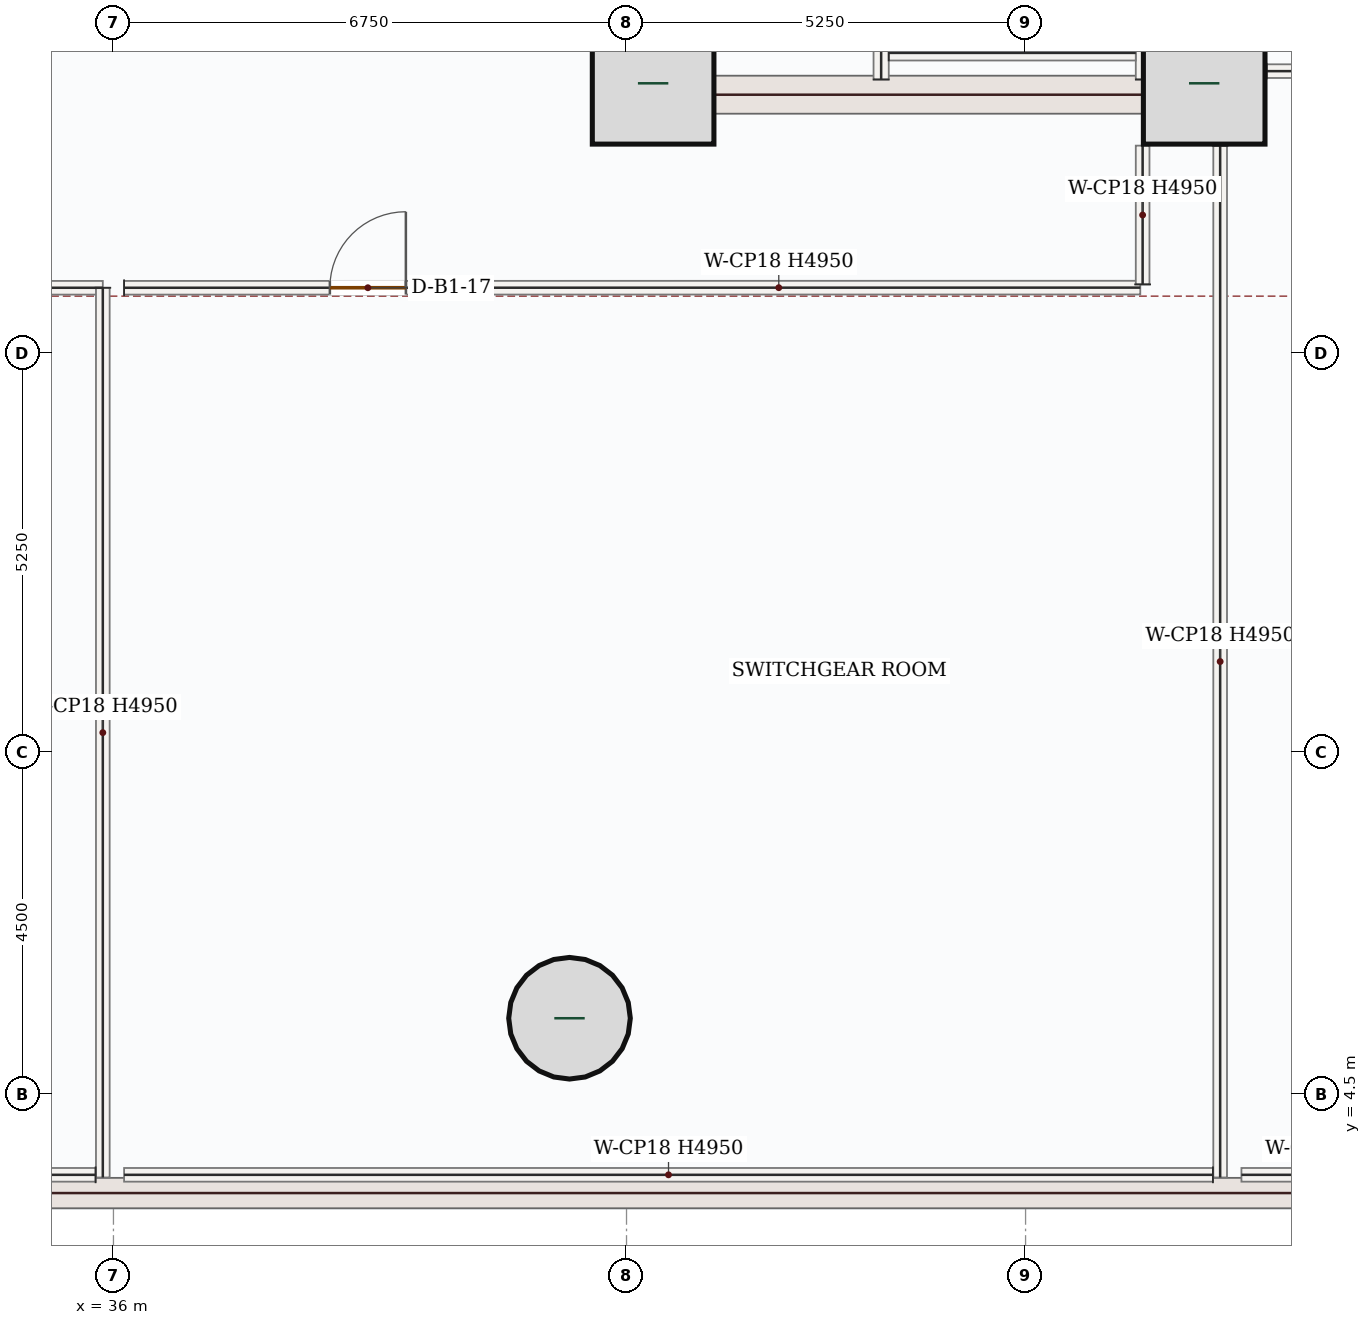
"""IFC4 building model, lengths in metres.
Left out: names, types, materials, properties, quantities, classifications, styles, units other than length and angle.
Written with IfcOpenShell. Run it as: python <this file> out.ifc"""

import sys

from ifc_helpers import new_model, si_unit, direction, frame, frame_2d, origin, origin_2d, place, context, subcontext, project, spatial, rectangle, hollow_circle, extrude, source, transform, mapped, element, fill, save


model = new_model("IFC4")
c1 = context("Model", 3, precision=1e-05, world=origin(), true_north=direction((0.0, 1.0)))
c2 = subcontext(c1, "Body", "Model", "MODEL_VIEW")
j1 = project(units=[si_unit("LENGTHUNIT", "METRE"), si_unit("PLANEANGLEUNIT", "RADIAN")], contexts=[c1])
p1 = place(None, origin())
s1 = spatial("IfcSite", under=j1, at=p1, CompositionType="ELEMENT")
p2 = place(p1, origin())
s2 = spatial("IfcBuilding", under=s1, at=p2, CompositionType="ELEMENT")
p3 = place(p2, frame((0.0, 0.0, -5.4)))
s3 = spatial("IfcBuildingStorey", under=s2, at=p3, CompositionType="ELEMENT", Elevation=-5.4)
m1 = source(origin(), c2, "Body", "SweptSolid", [
    extrude(rectangle(XDim=64.2, YDim=0.4, at=frame_2d((32.1, 0.0))), origin(), (0.0, 0.0, 1.0), 5.05),
])
p4 = place(p3, frame((3.9, 3.2, 0.0), z_axis=(0.0, 0.0, 1.0), x_axis=(1.0, 0.0, 0.0)))
e1 = element("IfcWall", 1, at=p4, inside=s3, PredefinedType="SHEAR", context=c2, shape_type="MappedRepresentation", body=[
    mapped(m1, transform((0.0, 0.0, 0.0), x_axis=(1.0, 0.0, 0.0), y_axis=(0.0, 1.0, 0.0), z_axis=(0.0, 0.0, 1.0), scale=1.0)),
])
p5 = place(p3, frame((43.0, 17.4, 0.0), z_axis=(0.0, 0.0, 1.0), x_axis=(0.0, 1.0, 0.0)))
e2 = element("IfcWall", 2, at=p5, inside=s3, PredefinedType="SHEAR", context=c2, shape_type="SweptSolid", body=[
    extrude(rectangle(XDim=8.55, YDim=0.5, at=frame_2d((4.275, 0.0))), origin(), (0.0, 0.0, 1.0), 4.95),
])
p6 = place(p5, frame((6.65, 0.0, 0.0)))
e3 = element("IfcOpeningElement", 3, at=p6, cuts=e2, PredefinedType="OPENING", context=c2, shape_type="SweptSolid", body=[
    extrude(rectangle(XDim=1.1, YDim=2.2, at=frame_2d((0.55, 1.1))), frame((0.0, 0.26, 0.0), z_axis=(0.0, -1.0, 0.0), x_axis=(1.0, 0.0, 0.0)), (0.0, 0.0, 1.0), 0.52),
])
p7 = place(p5, frame((1.75, 0.0, 0.0)))
e4 = element("IfcOpeningElement", 4, at=p7, cuts=e2, PredefinedType="OPENING", context=c2, shape_type="SweptSolid", body=[
    extrude(rectangle(XDim=1.3, YDim=2.2, at=frame_2d((0.65, 1.1))), frame((0.0, 0.26, 0.0), z_axis=(0.0, -1.0, 0.0), x_axis=(1.0, 0.0, 0.0)), (0.0, 0.0, 1.0), 0.52),
])
p8 = place(p5, frame((4.3, 0.0, 0.0)))
e5 = element("IfcOpeningElement", 5, at=p8, cuts=e2, PredefinedType="OPENING", context=c2, shape_type="SweptSolid", body=[
    extrude(rectangle(XDim=0.88, YDim=2.1, at=frame_2d((0.44, 1.05))), frame((0.0, 0.26, 0.0), z_axis=(0.0, -1.0, 0.0), x_axis=(1.0, 0.0, 0.0)), (0.0, 0.0, 1.0), 0.52),
])
m2 = source(origin(), c2, "Body", "SweptSolid", [
    extrude(rectangle(XDim=8.55, YDim=0.5, at=frame_2d((4.275, 0.0))), origin(), (0.0, 0.0, 1.0), 4.95),
])
p9 = place(p3, frame((50.5, 17.4, 0.0), z_axis=(0.0, 0.0, 1.0), x_axis=(0.0, 1.0, 0.0)))
e6 = element("IfcWall", 6, at=p9, inside=s3, PredefinedType="SHEAR", context=c2, shape_type="MappedRepresentation", body=[
    mapped(m2, transform((0.0, 0.0, 0.0), x_axis=(1.0, 0.0, 0.0), y_axis=(0.0, 1.0, 0.0), z_axis=(0.0, 0.0, 1.0), scale=1.0)),
])
m3 = source(origin(), c2, "Body", "SweptSolid", [
    extrude(rectangle(XDim=7.0, YDim=0.5, at=frame_2d((3.5, 0.0))), origin(), (0.0, 0.0, 1.0), 4.95),
])
p10 = place(p3, frame((43.25, 17.65, 0.0), z_axis=(0.0, 0.0, 1.0), x_axis=(1.0, 0.0, 0.0)))
e7 = element("IfcWall", 7, at=p10, inside=s3, PredefinedType="SHEAR", context=c2, shape_type="MappedRepresentation", body=[
    mapped(m3, transform((0.0, 0.0, 0.0), x_axis=(1.0, 0.0, 0.0), y_axis=(0.0, 1.0, 0.0), z_axis=(0.0, 0.0, 1.0), scale=1.0)),
])
m4 = source(origin(), c2, "Body", "SweptSolid", [
    extrude(rectangle(XDim=1.6, YDim=1.6, at=origin_2d()), origin(), (0.0, 0.0, 1.0), 5.4),
])
for number, where, z_axis, x_axis in (
    (8, (43.1, 17.8, 0.0), (0.0, 0.0, 1.0), (1.0, 0.0, 0.0)),
    (9, (50.35, 17.8, 0.0), (0.0, 0.0, 1.0), (1.0, 0.0, 0.0)),
):
    element("IfcColumn", number, at=place(p3, frame(where, z_axis=z_axis, x_axis=x_axis)), inside=s3, PredefinedType="COLUMN", context=c2, shape_type="MappedRepresentation", body=[
        mapped(m4, transform((0.0, 0.0, 0.0), x_axis=(1.0, 0.0, 0.0), y_axis=(0.0, 1.0, 0.0), z_axis=(0.0, 0.0, 1.0), scale=1.0)),
    ])
m5 = source(origin(), c2, "Body", "SweptSolid", [
    extrude(hollow_circle(Radius=0.8, WallThickness=0.06, at=origin_2d()), origin(), (0.0, 0.0, 1.0), 5.4),
])
p11 = place(p3, frame((42.0, 5.5, 0.0), z_axis=(0.0, 0.0, 1.0), x_axis=(1.0, 0.0, 0.0)))
e10 = element("IfcColumn", 10, at=p11, inside=s3, PredefinedType="COLUMN", context=c2, shape_type="MappedRepresentation", body=[
    mapped(m5, transform((0.0, 0.0, 0.0), x_axis=(1.0, 0.0, 0.0), y_axis=(0.0, 1.0, 0.0), z_axis=(0.0, 0.0, 1.0), scale=1.0)),
])
m6 = source(origin(), c2, "Body", "SweptSolid", [
    extrude(rectangle(XDim=7.87, YDim=0.2, at=frame_2d((3.935, 0.0))), origin(), (0.0, 0.0, 1.0), 4.95),
])
p12 = place(p3, frame((49.55, 17.85, 0.0), z_axis=(0.0, 0.0, 1.0), x_axis=(0.0, 1.0, 0.0)))
e11 = element("IfcWall", 11, at=p12, inside=s3, PredefinedType="SOLIDWALL", context=c2, shape_type="MappedRepresentation", body=[
    mapped(m6, transform((0.0, 0.0, 0.0), x_axis=(1.0, 0.0, 0.0), y_axis=(0.0, 1.0, 0.0), z_axis=(0.0, 0.0, 1.0), scale=1.0)),
])
p13 = place(p3, frame((46.1, 17.85, 0.0), z_axis=(0.0, 0.0, 1.0), x_axis=(0.0, 1.0, 0.0)))
e12 = element("IfcWall", 12, at=p13, inside=s3, PredefinedType="SOLIDWALL", context=c2, shape_type="SweptSolid", body=[
    extrude(rectangle(XDim=8.0, YDim=0.2, at=frame_2d((4.0, 0.0))), origin(), (0.0, 0.0, 1.0), 4.95),
])
p14 = place(p13, frame((6.3, 0.0, 0.0)))
e13 = element("IfcOpeningElement", 13, at=p14, cuts=e12, PredefinedType="OPENING", context=c2, shape_type="SweptSolid", body=[
    extrude(rectangle(XDim=1.05, YDim=2.15, at=frame_2d((0.525, 1.075))), frame((0.0, 0.11, 0.0), z_axis=(0.0, -1.0, 0.0), x_axis=(1.0, 0.0, 0.0)), (0.0, 0.0, 1.0), 0.22),
])
m7 = source(origin(), c2, "Body", "SweptSolid", [
    extrude(rectangle(XDim=3.25, YDim=0.2, at=frame_2d((1.625, 0.0))), origin(), (0.0, 0.0, 1.0), 4.95),
])
p15 = place(p3, frame((46.2, 18.2, 0.0), z_axis=(0.0, 0.0, 1.0), x_axis=(1.0, 0.0, 0.0)))
e14 = element("IfcWall", 14, at=p15, inside=s3, PredefinedType="SOLIDWALL", context=c2, shape_type="MappedRepresentation", body=[
    mapped(m7, transform((0.0, 0.0, 0.0), x_axis=(1.0, 0.0, 0.0), y_axis=(0.0, 1.0, 0.0), z_axis=(0.0, 0.0, 1.0), scale=1.0)),
])
p16 = place(p3, frame((22.491, 15.112, 0.0), z_axis=(0.0, 0.0, 1.0), x_axis=(0.99999999183, -0.000127830532, 0.0)))
e15 = element("IfcWall", 15, at=p16, inside=s3, PredefinedType="PARTITIONING", context=c2, shape_type="SweptSolid", body=[
    extrude(rectangle(XDim=13.369, YDim=0.18, at=frame_2d((6.685, 0.0))), origin(), (0.0, 0.0, 1.0), 4.95),
])
p17 = place(p16, frame((9.662, 0.0, 0.0)))
e16 = element("IfcOpeningElement", 16, at=p17, cuts=e15, PredefinedType="OPENING", context=c2, shape_type="SweptSolid", body=[
    extrude(rectangle(XDim=1.0, YDim=2.15, at=frame_2d((0.5, 1.075))), frame((0.0, 0.1, 0.0), z_axis=(0.0, -1.0, 0.0), x_axis=(1.0, 0.0, 0.0)), (0.0, 0.0, 1.0), 0.2),
])
m8 = source(origin(), c2, "Body", "SweptSolid", [
    extrude(rectangle(XDim=11.705, YDim=0.18, at=frame_2d((5.853, 0.0))), origin(), (0.0, 0.0, 1.0), 4.95),
])
p18 = place(p3, frame((35.86, 15.11, 0.0), z_axis=(0.0, 0.0, 1.0), x_axis=(0.0, -1.0, 0.0)))
e17 = element("IfcWall", 17, at=p18, inside=s3, PredefinedType="PARTITIONING", context=c2, shape_type="MappedRepresentation", body=[
    mapped(m8, transform((0.0, 0.0, 0.0), x_axis=(1.0, 0.0, 0.0), y_axis=(0.0, 1.0, 0.0), z_axis=(0.0, 0.0, 1.0), scale=1.0)),
])
m9 = source(origin(), c2, "Body", "SweptSolid", [
    extrude(rectangle(XDim=14.325, YDim=0.18, at=frame_2d((7.163, 0.0))), origin(), (0.0, 0.0, 1.0), 4.95),
])
p19 = place(p3, frame((35.765, 3.44, 0.0), z_axis=(0.0, 0.0, 1.0), x_axis=(-1.0, 0.0, 0.0)))
e18 = element("IfcWall", 18, at=p19, inside=s3, PredefinedType="PARTITIONING", context=c2, shape_type="MappedRepresentation", body=[
    mapped(m9, transform((0.0, 0.0, 0.0), x_axis=(1.0, 0.0, 0.0), y_axis=(0.0, 1.0, 0.0), z_axis=(0.0, 0.0, 1.0), scale=1.0)),
])
m10 = source(origin(), c2, "Body", "SweptSolid", [
    extrude(rectangle(XDim=13.575, YDim=0.18, at=frame_2d((6.788, 0.0))), origin(), (0.0, 0.0, 1.0), 4.95),
])
p20 = place(p3, frame((50.56, 16.98, 0.0), z_axis=(0.0, 0.0, 1.0), x_axis=(0.0, -1.0, 0.0)))
e19 = element("IfcWall", 19, at=p20, inside=s3, PredefinedType="PARTITIONING", context=c2, shape_type="MappedRepresentation", body=[
    mapped(m10, transform((0.0, 0.0, 0.0), x_axis=(1.0, 0.0, 0.0), y_axis=(0.0, 1.0, 0.0), z_axis=(0.0, 0.0, 1.0), scale=1.0)),
])
m11 = source(origin(), c2, "Body", "SweptSolid", [
    extrude(rectangle(XDim=14.325, YDim=0.18, at=frame_2d((7.163, 0.0))), origin(), (0.0, 0.0, 1.0), 4.95),
])
p21 = place(p3, frame((50.465, 3.44, 0.0), z_axis=(0.0, 0.0, 1.0), x_axis=(-1.0, 0.0, 0.0)))
e20 = element("IfcWall", 20, at=p21, inside=s3, PredefinedType="PARTITIONING", context=c2, shape_type="MappedRepresentation", body=[
    mapped(m11, transform((0.0, 0.0, 0.0), x_axis=(1.0, 0.0, 0.0), y_axis=(0.0, 1.0, 0.0), z_axis=(0.0, 0.0, 1.0), scale=1.0)),
])
p22 = place(p3, frame((36.14, 15.11, 0.0), z_axis=(0.0, 0.0, 1.0), x_axis=(0.99999999183, 0.000127830532, 0.0)))
e21 = element("IfcWall", 21, at=p22, inside=s3, PredefinedType="PARTITIONING", context=c2, shape_type="SweptSolid", body=[
    extrude(rectangle(XDim=13.369, YDim=0.18, at=frame_2d((6.685, 0.0))), origin(), (0.0, 0.0, 1.0), 4.95),
])
p23 = place(p22, frame((2.707, 0.0, 0.0)))
e22 = element("IfcOpeningElement", 22, at=p23, cuts=e21, PredefinedType="OPENING", context=c2, shape_type="SweptSolid", body=[
    extrude(rectangle(XDim=1.0, YDim=2.15, at=frame_2d((0.5, 1.075))), frame((0.0, 0.1, 0.0), z_axis=(0.0, -1.0, 0.0), x_axis=(1.0, 0.0, 0.0)), (0.0, 0.0, 1.0), 0.2),
])
m12 = source(origin(), c2, "Body", "SweptSolid", [
    extrude(rectangle(XDim=1.826, YDim=0.18, at=frame_2d((0.913, 0.0))), origin(), (0.0, 0.0, 1.0), 4.95),
])
p24 = place(p3, frame((49.54, 15.154, 0.0), z_axis=(0.0, 0.0, 1.0), x_axis=(0.0, 1.0, 0.0)))
e23 = element("IfcWall", 23, at=p24, inside=s3, PredefinedType="PARTITIONING", context=c2, shape_type="MappedRepresentation", body=[
    mapped(m12, transform((0.0, 0.0, 0.0), x_axis=(1.0, 0.0, 0.0), y_axis=(0.0, 1.0, 0.0), z_axis=(0.0, 0.0, 1.0), scale=1.0)),
])
m13 = source(origin(), c2, "Body", "SweptSolid", [
    extrude(rectangle(XDim=2.59, YDim=0.18, at=frame_2d((1.295, 0.0))), origin(), (0.0, 0.0, 1.0), 4.95),
])
p25 = place(p3, frame((53.43, 3.44, 0.0), z_axis=(0.0, 0.0, 1.0), x_axis=(-1.0, 0.0, 0.0)))
e24 = element("IfcWall", 24, at=p25, inside=s3, PredefinedType="PARTITIONING", context=c2, shape_type="MappedRepresentation", body=[
    mapped(m13, transform((0.0, 0.0, 0.0), x_axis=(1.0, 0.0, 0.0), y_axis=(0.0, 1.0, 0.0), z_axis=(0.0, 0.0, 1.0), scale=1.0)),
])
m14 = source(origin(), c2, "Body", "SweptSolid", [
    extrude(rectangle(XDim=1.724, YDim=0.18, at=frame_2d((0.862, 0.0))), origin(), (0.0, 0.0, 1.0), 3.992),
])
p26 = place(p3, frame((51.17, 17.96, 0.0), z_axis=(0.0, 0.0, 1.0), x_axis=(1.0, 0.0, 0.0)))
e25 = element("IfcWall", 25, at=p26, inside=s3, PredefinedType="PARTITIONING", context=c2, shape_type="MappedRepresentation", body=[
    mapped(m14, transform((0.0, 0.0, 0.0), x_axis=(1.0, 0.0, 0.0), y_axis=(0.0, 1.0, 0.0), z_axis=(0.0, 0.0, 1.0), scale=1.0)),
])
m15 = source(origin(), c2, "Body", "SweptSolid", [
    extrude(rectangle(XDim=1.0, YDim=2.15, at=frame_2d((0.5, 1.075))), frame((0.0, 0.025, 0.0), z_axis=(0.0, -1.0, 0.0), x_axis=(1.0, 0.0, 0.0)), (0.0, 0.0, 1.0), 0.05),
])
p27 = place(p23, origin())
e26 = element("IfcDoor", 26, at=p27, inside=s3, OperationType="SINGLE_SWING_RIGHT", PredefinedType="DOOR", context=c2, shape_type="MappedRepresentation", body=[
    mapped(m15, transform((0.0, 0.0, 0.0), x_axis=(1.0, 0.0, 0.0), y_axis=(0.0, 1.0, 0.0), z_axis=(0.0, 0.0, 1.0), scale=1.0)),
])
fill(e22, e26)
save(model, sys.argv[1])
